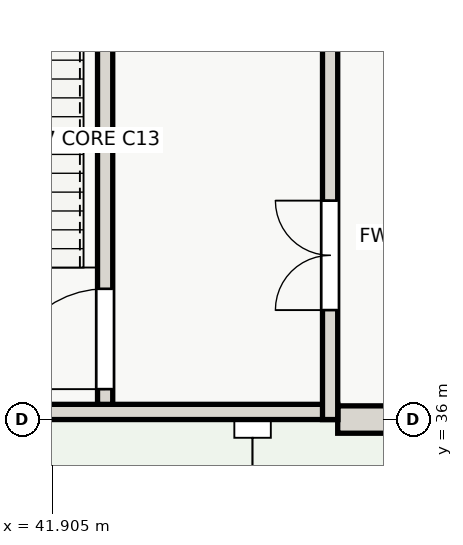
"""IFC4 building model, lengths in metres.
Left out: names, types, materials, properties, quantities, classifications, styles, units other than length and angle.
Written with IfcOpenShell. Run it as: python <this file> out.ifc"""

import sys

from ifc_helpers import new_model, si_unit, direction, frame, frame_2d, origin, place, context, subcontext, project, spatial, rectangle, extrude, element, fill, save


model = new_model("IFC4")
c1 = context("Model", 3, precision=1e-05, world=origin(), true_north=direction((0.0, 1.0)))
c2 = subcontext(c1, "Body", "Model", "MODEL_VIEW")
j1 = project(units=[si_unit("LENGTHUNIT", "METRE"), si_unit("PLANEANGLEUNIT", "RADIAN")], contexts=[c1])
p1 = place(None, origin())
s1 = spatial("IfcSite", under=j1, at=p1, CompositionType="ELEMENT")
p2 = place(p1, origin())
s2 = spatial("IfcBuilding", under=s1, at=p2, CompositionType="ELEMENT")
p3 = place(p2, origin())
s3 = spatial("IfcBuildingStorey", under=s2, at=p3, CompositionType="ELEMENT", Elevation=0.0)
p4 = place(p3, frame((48.0, 36.0, 0.0), z_axis=(0.0, 0.0, 1.0), x_axis=(-1.0, 0.0, 0.0)))
e1 = element("IfcWall", 1, at=p4, inside=s3, PredefinedType="SOLIDWALL", context=c2, shape_type="SweptSolid", body=[
    extrude(rectangle(XDim=1.4, YDim=0.45, at=frame_2d((0.7, 0.0))), origin(), (0.0, 0.0, 1.0), 3.55),
])
p5 = place(p3, frame((46.6, 36.125, 0.0), z_axis=(0.0, 0.0, 1.0), x_axis=(-1.0, 0.0, 0.0)))
e2 = element("IfcWall", 2, at=p5, inside=s3, PredefinedType="SHEAR", context=c2, shape_type="SweptSolid", body=[
    extrude(rectangle(XDim=9.2, YDim=0.25, at=frame_2d((4.6, 0.0))), origin(), (0.0, 0.0, 1.0), 4.2),
])
p6 = place(p5, frame((5.9, 0.0, 0.0)))
e3 = element("IfcOpeningElement", 3, at=p6, cuts=e2, PredefinedType="OPENING", context=c2, shape_type="SweptSolid", body=[
    extrude(rectangle(XDim=1.9, YDim=2.2, at=frame_2d((0.95, 1.1))), frame((0.0, 0.135, 0.0), z_axis=(0.0, -1.0, 0.0), x_axis=(1.0, 0.0, 0.0)), (0.0, 0.0, 1.0), 0.27),
])
p7 = place(p3, frame((46.475, 36.0, 0.0), z_axis=(0.0, 0.0, 1.0), x_axis=(0.0, 1.0, 0.0)))
e4 = element("IfcWall", 4, at=p7, inside=s3, PredefinedType="SHEAR", context=c2, shape_type="SweptSolid", body=[
    extrude(rectangle(XDim=9.2, YDim=0.25, at=frame_2d((4.6, 0.0))), origin(), (0.0, 0.0, 1.0), 4.2),
])
p8 = place(p7, frame((1.8, 0.0, 0.0)))
e5 = element("IfcOpeningElement", 5, at=p8, cuts=e4, PredefinedType="OPENING", context=c2, shape_type="SweptSolid", body=[
    extrude(rectangle(XDim=1.8, YDim=2.15, at=frame_2d((0.9, 1.075))), frame((0.0, 0.135, 0.0), z_axis=(0.0, -1.0, 0.0), x_axis=(1.0, 0.0, 0.0)), (0.0, 0.0, 1.0), 0.27),
])
p9 = place(p3, frame((42.775, 36.25, 0.0), z_axis=(0.0, 0.0, 1.0), x_axis=(0.0, 1.0, 0.0)))
e6 = element("IfcWall", 6, at=p9, inside=s3, PredefinedType="SHEAR", context=c2, shape_type="SweptSolid", body=[
    extrude(rectangle(XDim=8.7, YDim=0.25, at=frame_2d((4.35, 0.0))), origin(), (0.0, 0.0, 1.0), 4.2),
])
p10 = place(p9, frame((0.25, 0.0, 0.0)))
e7 = element("IfcOpeningElement", 7, at=p10, cuts=e6, PredefinedType="OPENING", context=c2, shape_type="SweptSolid", body=[
    extrude(rectangle(XDim=1.65, YDim=2.1, at=frame_2d((0.825, 1.05))), frame((0.0, 0.135, 0.0), z_axis=(0.0, -1.0, 0.0), x_axis=(1.0, 0.0, 0.0)), (0.0, 0.0, 1.0), 0.27),
])
p11 = place(p8, origin())
e8 = element("IfcDoor", 8, at=p11, inside=s3, OperationType="DOUBLE_DOOR_SINGLE_SWING", PredefinedType="DOOR", context=c2, shape_type="SweptSolid", body=[
    extrude(rectangle(XDim=1.8, YDim=2.15, at=frame_2d((0.9, 1.075))), frame((0.0, 0.025, 0.0), z_axis=(0.0, -1.0, 0.0), x_axis=(1.0, 0.0, 0.0)), (0.0, 0.0, 1.0), 0.05),
])
fill(e5, e8)
p12 = place(p10, origin())
e9 = element("IfcDoor", 9, at=p12, inside=s3, OperationType="SINGLE_SWING_LEFT", PredefinedType="DOOR", context=c2, shape_type="SweptSolid", body=[
    extrude(rectangle(XDim=1.65, YDim=2.1, at=frame_2d((0.825, 1.05))), frame((0.0, 0.025, 0.0), z_axis=(0.0, -1.0, 0.0), x_axis=(1.0, 0.0, 0.0)), (0.0, 0.0, 1.0), 0.05),
])
fill(e7, e9)
save(model, sys.argv[1])
